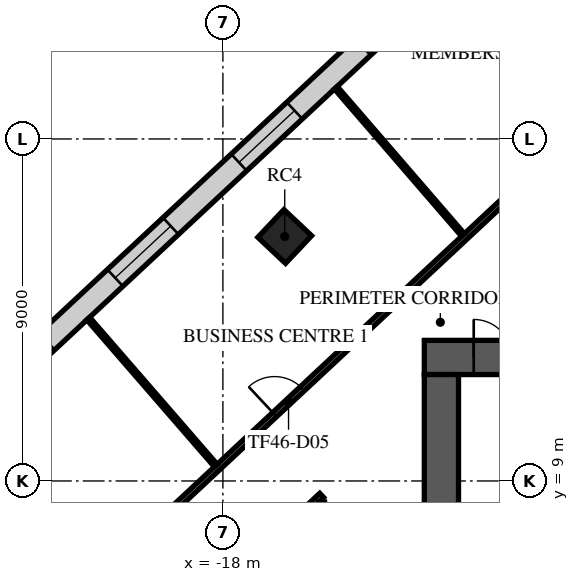
"""IFC4 building model, lengths in metres.
Left out: names, types, materials, properties, quantities, classifications, styles, units other than length and angle.
Written with IfcOpenShell. Run it as: python <this file> out.ifc"""

import sys

from ifc_helpers import new_model, si_unit, direction, frame, frame_2d, origin, origin_2d, place, context, subcontext, project, spatial, rectangle, extrude, element, fill, save


model = new_model("IFC4")
c1 = context("Model", 3, precision=1e-05, world=origin(), true_north=direction((0.0, 1.0)))
c2 = subcontext(c1, "Body", "Model", "MODEL_VIEW")
j1 = project(units=[si_unit("LENGTHUNIT", "METRE"), si_unit("PLANEANGLEUNIT", "RADIAN")], contexts=[c1])
p1 = place(None, origin())
s1 = spatial("IfcSite", under=j1, at=p1, CompositionType="ELEMENT")
p2 = place(p1, origin())
s2 = spatial("IfcBuilding", under=s1, at=p2, CompositionType="ELEMENT")
p3 = place(p2, frame((0.0, 0.0, 197.3)))
s3 = spatial("IfcBuildingStorey", under=s2, at=p3, CompositionType="ELEMENT", Elevation=197.3)
p4 = place(p3, frame((-16.373, 15.433, 0.0), z_axis=(0.0, 0.0, 1.0), x_axis=(0.685916152371, 0.727680583715, 0.0)))
e1 = element("IfcColumn", 1, at=p4, inside=s3, PredefinedType="COLUMN", context=c2, shape_type="SweptSolid", body=[
    extrude(rectangle(XDim=1.0, YDim=1.0, at=origin_2d()), origin(), (0.0, 0.0, 1.0), 4.0),
])
p5 = place(p3, frame((-12.7, 12.25, 0.0), z_axis=(0.0, 0.0, 1.0), x_axis=(1.0, 0.0, 0.0)))
e2 = element("IfcWall", 2, at=p5, inside=s3, PredefinedType="SHEAR", context=c2, shape_type="SweptSolid", body=[
    extrude(rectangle(XDim=25.4, YDim=0.9, at=frame_2d((12.7, 0.0))), origin(), (0.0, 0.0, 1.0), 3.62),
])
p6 = place(p5, frame((11.5, 0.0, 0.0)))
e3 = element("IfcOpeningElement", 3, at=p6, cuts=e2, PredefinedType="OPENING", context=c2, shape_type="SweptSolid", body=[
    extrude(rectangle(XDim=2.4, YDim=2.4, at=frame_2d((1.2, 1.2))), frame((0.0, 0.46, 0.0), z_axis=(0.0, -1.0, 0.0), x_axis=(1.0, 0.0, 0.0)), (0.0, 0.0, 1.0), 0.92),
])
p7 = place(p5, frame((22.325, 0.0, 0.0)))
e4 = element("IfcOpeningElement", 4, at=p7, cuts=e2, PredefinedType="OPENING", context=c2, shape_type="SweptSolid", body=[
    extrude(rectangle(XDim=1.2, YDim=2.1, at=frame_2d((0.6, 1.05))), frame((0.0, 0.46, 0.0), z_axis=(0.0, -1.0, 0.0), x_axis=(1.0, 0.0, 0.0)), (0.0, 0.0, 1.0), 0.92),
])
p8 = place(p5, frame((1.3, 0.0, 0.0)))
e5 = element("IfcOpeningElement", 5, at=p8, cuts=e2, PredefinedType="OPENING", context=c2, shape_type="SweptSolid", body=[
    extrude(rectangle(XDim=1.0, YDim=2.1, at=frame_2d((0.5, 1.05))), frame((0.0, 0.46, 0.0), z_axis=(0.0, -1.0, 0.0), x_axis=(1.0, 0.0, 0.0)), (0.0, 0.0, 1.0), 0.92),
])
p9 = place(p3, frame((-12.25, -11.8, 0.0), z_axis=(0.0, 0.0, 1.0), x_axis=(0.0, 1.0, 0.0)))
e6 = element("IfcWall", 6, at=p9, inside=s3, PredefinedType="SHEAR", context=c2, shape_type="SweptSolid", body=[
    extrude(rectangle(XDim=23.6, YDim=0.9, at=frame_2d((11.8, 0.0))), origin(), (0.0, 0.0, 1.0), 3.62),
])
p10 = place(p9, frame((10.6, 0.0, 0.0)))
e7 = element("IfcOpeningElement", 7, at=p10, cuts=e6, PredefinedType="OPENING", context=c2, shape_type="SweptSolid", body=[
    extrude(rectangle(XDim=2.4, YDim=2.4, at=frame_2d((1.2, 1.2))), frame((0.0, 0.46, 0.0), z_axis=(0.0, -1.0, 0.0), x_axis=(1.0, 0.0, 0.0)), (0.0, 0.0, 1.0), 0.92),
])
p11 = place(p3, frame((1.073, 34.773, 0.0), z_axis=(0.0, 0.0, 1.0), x_axis=(-0.731351780381, -0.682000420333, 0.0)))
e8 = element("IfcWall", 8, at=p11, inside=s3, PredefinedType="STANDARD", context=c2, shape_type="SweptSolid", body=[
    extrude(rectangle(XDim=49.0, YDim=0.6, at=frame_2d((24.5, 0.0))), origin(), (0.0, 0.0, 1.0), 3.62),
])
p12 = place(p11, frame((1.227, 0.0, 0.9)))
e9 = element("IfcOpeningElement", 9, at=p12, cuts=e8, PredefinedType="OPENING", context=c2, shape_type="SweptSolid", body=[
    extrude(rectangle(XDim=2.0, YDim=2.1, at=frame_2d((1.0, 1.05))), frame((0.0, 0.31, 0.0), z_axis=(0.0, -1.0, 0.0), x_axis=(1.0, 0.0, 0.0)), (0.0, 0.0, 1.0), 0.62),
])
p13 = place(p11, frame((5.682, 0.0, 0.9)))
e10 = element("IfcOpeningElement", 10, at=p13, cuts=e8, PredefinedType="OPENING", context=c2, shape_type="SweptSolid", body=[
    extrude(rectangle(XDim=2.0, YDim=2.1, at=frame_2d((1.0, 1.05))), frame((0.0, 0.31, 0.0), z_axis=(0.0, -1.0, 0.0), x_axis=(1.0, 0.0, 0.0)), (0.0, 0.0, 1.0), 0.62),
])
p14 = place(p11, frame((14.591, 0.0, 0.9)))
e11 = element("IfcOpeningElement", 11, at=p14, cuts=e8, PredefinedType="OPENING", context=c2, shape_type="SweptSolid", body=[
    extrude(rectangle(XDim=2.0, YDim=2.1, at=frame_2d((1.0, 1.05))), frame((0.0, 0.31, 0.0), z_axis=(0.0, -1.0, 0.0), x_axis=(1.0, 0.0, 0.0)), (0.0, 0.0, 1.0), 0.62),
])
p15 = place(p11, frame((19.045, 0.0, 0.9)))
e12 = element("IfcOpeningElement", 12, at=p15, cuts=e8, PredefinedType="OPENING", context=c2, shape_type="SweptSolid", body=[
    extrude(rectangle(XDim=2.0, YDim=2.1, at=frame_2d((1.0, 1.05))), frame((0.0, 0.31, 0.0), z_axis=(0.0, -1.0, 0.0), x_axis=(1.0, 0.0, 0.0)), (0.0, 0.0, 1.0), 0.62),
])
p16 = place(p11, frame((23.5, 0.0, 0.9)))
e13 = element("IfcOpeningElement", 13, at=p16, cuts=e8, PredefinedType="OPENING", context=c2, shape_type="SweptSolid", body=[
    extrude(rectangle(XDim=2.0, YDim=2.1, at=frame_2d((1.0, 1.05))), frame((0.0, 0.31, 0.0), z_axis=(0.0, -1.0, 0.0), x_axis=(1.0, 0.0, 0.0)), (0.0, 0.0, 1.0), 0.62),
])
p17 = place(p11, frame((27.955, 0.0, 0.9)))
e14 = element("IfcOpeningElement", 14, at=p17, cuts=e8, PredefinedType="OPENING", context=c2, shape_type="SweptSolid", body=[
    extrude(rectangle(XDim=2.0, YDim=2.1, at=frame_2d((1.0, 1.05))), frame((0.0, 0.31, 0.0), z_axis=(0.0, -1.0, 0.0), x_axis=(1.0, 0.0, 0.0)), (0.0, 0.0, 1.0), 0.62),
])
p18 = place(p11, frame((32.409, 0.0, 0.9)))
e15 = element("IfcOpeningElement", 15, at=p18, cuts=e8, PredefinedType="OPENING", context=c2, shape_type="SweptSolid", body=[
    extrude(rectangle(XDim=2.0, YDim=2.1, at=frame_2d((1.0, 1.05))), frame((0.0, 0.31, 0.0), z_axis=(0.0, -1.0, 0.0), x_axis=(1.0, 0.0, 0.0)), (0.0, 0.0, 1.0), 0.62),
])
p19 = place(p11, frame((36.864, 0.0, 0.9)))
e16 = element("IfcOpeningElement", 16, at=p19, cuts=e8, PredefinedType="OPENING", context=c2, shape_type="SweptSolid", body=[
    extrude(rectangle(XDim=2.0, YDim=2.1, at=frame_2d((1.0, 1.05))), frame((0.0, 0.31, 0.0), z_axis=(0.0, -1.0, 0.0), x_axis=(1.0, 0.0, 0.0)), (0.0, 0.0, 1.0), 0.62),
])
p20 = place(p11, frame((41.318, 0.0, 0.9)))
e17 = element("IfcOpeningElement", 17, at=p20, cuts=e8, PredefinedType="OPENING", context=c2, shape_type="SweptSolid", body=[
    extrude(rectangle(XDim=2.0, YDim=2.1, at=frame_2d((1.0, 1.05))), frame((0.0, 0.31, 0.0), z_axis=(0.0, -1.0, 0.0), x_axis=(1.0, 0.0, 0.0)), (0.0, 0.0, 1.0), 0.62),
])
p21 = place(p11, frame((45.773, 0.0, 0.9)))
e18 = element("IfcOpeningElement", 18, at=p21, cuts=e8, PredefinedType="OPENING", context=c2, shape_type="SweptSolid", body=[
    extrude(rectangle(XDim=2.0, YDim=2.1, at=frame_2d((1.0, 1.05))), frame((0.0, 0.31, 0.0), z_axis=(0.0, -1.0, 0.0), x_axis=(1.0, 0.0, 0.0)), (0.0, 0.0, 1.0), 0.62),
])
p22 = place(p3, frame((-24.623, 3.301, 0.0), z_axis=(0.0, 0.0, 1.0), x_axis=(0.731351215564, 0.68200102602, 0.0)))
e19 = element("IfcWall", 19, at=p22, inside=s3, PredefinedType="PARTITIONING", context=c2, shape_type="SweptSolid", body=[
    extrude(rectangle(XDim=31.513, YDim=0.15, at=frame_2d((15.757, 0.0))), origin(), (0.0, 0.0, 1.0), 3.17),
])
p23 = place(p22, frame((1.05, 0.0, 0.0)))
e20 = element("IfcOpeningElement", 20, at=p23, cuts=e19, PredefinedType="OPENING", context=c2, shape_type="SweptSolid", body=[
    extrude(rectangle(XDim=1.8, YDim=2.1, at=frame_2d((0.9, 1.05))), frame((0.0, 0.085, 0.0), z_axis=(0.0, -1.0, 0.0), x_axis=(1.0, 0.0, 0.0)), (0.0, 0.0, 1.0), 0.17),
])
p24 = place(p22, frame((5.55, 0.0, 0.0)))
e21 = element("IfcOpeningElement", 21, at=p24, cuts=e19, PredefinedType="OPENING", context=c2, shape_type="SweptSolid", body=[
    extrude(rectangle(XDim=1.0, YDim=2.1, at=frame_2d((0.5, 1.05))), frame((0.0, 0.085, 0.0), z_axis=(0.0, -1.0, 0.0), x_axis=(1.0, 0.0, 0.0)), (0.0, 0.0, 1.0), 0.17),
])
p25 = place(p22, frame((10.917, 0.0, 0.0)))
e22 = element("IfcOpeningElement", 22, at=p25, cuts=e19, PredefinedType="OPENING", context=c2, shape_type="SweptSolid", body=[
    extrude(rectangle(XDim=1.0, YDim=2.1, at=frame_2d((0.5, 1.05))), frame((0.0, 0.085, 0.0), z_axis=(0.0, -1.0, 0.0), x_axis=(1.0, 0.0, 0.0)), (0.0, 0.0, 1.0), 0.17),
])
p26 = place(p22, frame((20.812, 0.0, 0.0)))
e23 = element("IfcOpeningElement", 23, at=p26, cuts=e19, PredefinedType="OPENING", context=c2, shape_type="SweptSolid", body=[
    extrude(rectangle(XDim=1.0, YDim=2.1, at=frame_2d((0.5, 1.05))), frame((0.0, 0.085, 0.0), z_axis=(0.0, -1.0, 0.0), x_axis=(1.0, 0.0, 0.0)), (0.0, 0.0, 1.0), 0.17),
])
p27 = place(p3, frame((-22.931, 1.597, 0.0), z_axis=(0.0, 0.0, 1.0), x_axis=(0.73135636677, 0.681995502027, 0.0)))
e24 = element("IfcWall", 24, at=p27, inside=s3, PredefinedType="PARTITIONING", context=c2, shape_type="SweptSolid", body=[
    extrude(rectangle(XDim=10.298, YDim=0.15, at=frame_2d((5.149, 0.0))), origin(), (0.0, 0.0, 1.0), 3.17),
])
p28 = place(p3, frame((-21.542, 13.272, 0.0), z_axis=(0.0, 0.0, 1.0), x_axis=(0.655282861231, -0.755383592472, 0.0)))
e25 = element("IfcWall", 25, at=p28, inside=s3, PredefinedType="PARTITIONING", context=c2, shape_type="SweptSolid", body=[
    extrude(rectangle(XDim=5.117, YDim=0.1, at=frame_2d((2.559, 0.0))), origin(), (0.0, 0.0, 1.0), 2.97),
])
p29 = place(p3, frame((-15.027, 19.347, 0.0), z_axis=(0.0, 0.0, 1.0), x_axis=(0.653552799086, -0.75688092776, 0.0)))
e26 = element("IfcWall", 26, at=p29, inside=s3, PredefinedType="PARTITIONING", context=c2, shape_type="SweptSolid", body=[
    extrude(rectangle(XDim=5.118, YDim=0.1, at=frame_2d((2.559, 0.0))), origin(), (0.0, 0.0, 1.0), 2.97),
])
p30 = place(p8, origin())
e27 = element("IfcDoor", 27, at=p30, inside=s3, OperationType="SINGLE_SWING_LEFT", PredefinedType="DOOR", context=c2, shape_type="SweptSolid", body=[
    extrude(rectangle(XDim=1.0, YDim=2.1, at=frame_2d((0.5, 1.05))), frame((0.0, 0.025, 0.0), z_axis=(0.0, -1.0, 0.0), x_axis=(1.0, 0.0, 0.0)), (0.0, 0.0, 1.0), 0.05),
])
fill(e5, e27)
p31 = place(p16, origin())
e28 = element("IfcWindow", 28, at=p31, inside=s3, PartitioningType="SINGLE_PANEL", PredefinedType="WINDOW", context=c2, shape_type="SweptSolid", body=[
    extrude(rectangle(XDim=2.0, YDim=2.1, at=frame_2d((1.0, 1.05))), frame((0.0, 0.03, 0.0), z_axis=(0.0, -1.0, 0.0), x_axis=(1.0, 0.0, 0.0)), (0.0, 0.0, 1.0), 0.06),
])
fill(e13, e28)
p32 = place(p17, origin())
e29 = element("IfcWindow", 29, at=p32, inside=s3, PartitioningType="SINGLE_PANEL", PredefinedType="WINDOW", context=c2, shape_type="SweptSolid", body=[
    extrude(rectangle(XDim=2.0, YDim=2.1, at=frame_2d((1.0, 1.05))), frame((0.0, 0.03, 0.0), z_axis=(0.0, -1.0, 0.0), x_axis=(1.0, 0.0, 0.0)), (0.0, 0.0, 1.0), 0.06),
])
fill(e14, e29)
p33 = place(p25, origin())
e30 = element("IfcDoor", 30, at=p33, inside=s3, OperationType="SINGLE_SWING_RIGHT", PredefinedType="DOOR", context=c2, shape_type="SweptSolid", body=[
    extrude(rectangle(XDim=1.0, YDim=2.1, at=frame_2d((0.5, 1.05))), frame((0.0, 0.025, 0.0), z_axis=(0.0, -1.0, 0.0), x_axis=(1.0, 0.0, 0.0)), (0.0, 0.0, 1.0), 0.05),
])
fill(e22, e30)
save(model, sys.argv[1])
